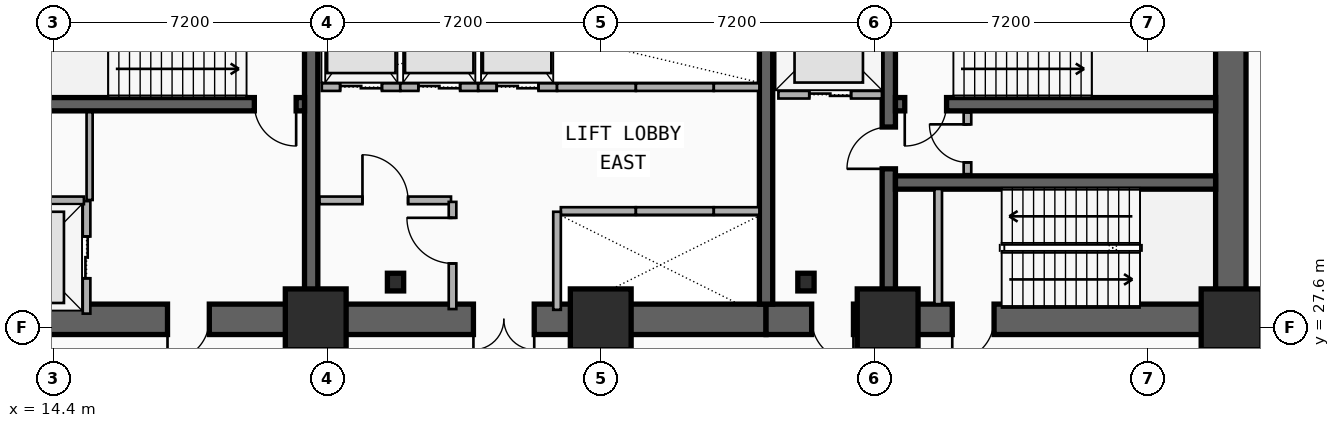
"""IFC4 building model, lengths in metres.
Left out: names, types, materials, properties, quantities, classifications, styles, units other than length and angle.
Written with IfcOpenShell. Run it as: python <this file> out.ifc"""

import sys

from ifc_helpers import new_model, si_unit, direction, frame, frame_2d, origin, origin_2d, place, context, subcontext, project, spatial, rectangle, i_section, extrude, element, fill, save


model = new_model("IFC4")
c1 = context("Model", 3, precision=1e-05, world=origin(), true_north=direction((0.0, 1.0)))
c2 = subcontext(c1, "Body", "Model", "MODEL_VIEW")
j1 = project(units=[si_unit("LENGTHUNIT", "METRE"), si_unit("PLANEANGLEUNIT", "RADIAN")], contexts=[c1])
p1 = place(None, origin())
s1 = spatial("IfcSite", under=j1, at=p1, CompositionType="ELEMENT")
p2 = place(p1, origin())
s2 = spatial("IfcBuilding", under=s1, at=p2, CompositionType="ELEMENT")
p3 = place(p2, frame((0.0, 0.0, 5.4)))
s3 = spatial("IfcBuildingStorey", under=s2, at=p3, CompositionType="ELEMENT", Elevation=5.4)
p4 = place(p3, frame((21.18, 27.82, 0.0), z_axis=(0.0, 0.0, 1.0), x_axis=(-1.0, 0.0, 0.0)))
e1 = element("IfcWall", 1, at=p4, inside=s3, PredefinedType="SHEAR", context=c2, shape_type="SweptSolid", body=[
    extrude(rectangle(XDim=9.03, YDim=0.8, at=frame_2d((4.515, 0.0))), origin(), (0.0, 0.0, 1.0), 5.0),
])
p5 = place(p4, frame((2.68, 0.0, 0.0)))
e2 = element("IfcOpeningElement", 2, at=p5, cuts=e1, PredefinedType="OPENING", context=c2, shape_type="SweptSolid", body=[
    extrude(rectangle(XDim=1.1, YDim=2.15, at=frame_2d((0.55, 1.075))), frame((0.0, 0.41, 0.0), z_axis=(0.0, -1.0, 0.0), x_axis=(1.0, 0.0, 0.0)), (0.0, 0.0, 1.0), 0.82),
])
p6 = place(p3, frame((33.15, 27.82, 0.0), z_axis=(0.0, 0.0, 1.0), x_axis=(-1.0, 0.0, 0.0)))
e3 = element("IfcWall", 3, at=p6, inside=s3, PredefinedType="SHEAR", context=c2, shape_type="SweptSolid", body=[
    extrude(rectangle(XDim=11.97, YDim=0.8, at=frame_2d((5.985, 0.0))), origin(), (0.0, 0.0, 1.0), 5.0),
])
p7 = place(p6, frame((6.1, 0.0, 0.0)))
e4 = element("IfcOpeningElement", 4, at=p7, cuts=e3, PredefinedType="OPENING", context=c2, shape_type="SweptSolid", body=[
    extrude(rectangle(XDim=1.6, YDim=2.2, at=frame_2d((0.8, 1.1))), frame((0.0, 0.41, 0.0), z_axis=(0.0, -1.0, 0.0), x_axis=(1.0, 0.0, 0.0)), (0.0, 0.0, 1.0), 0.82),
])
p8 = place(p3, frame((45.38, 27.82, 0.0), z_axis=(0.0, 0.0, 1.0), x_axis=(-1.0, 0.0, 0.0)))
e5 = element("IfcWall", 5, at=p8, inside=s3, PredefinedType="SHEAR", context=c2, shape_type="SweptSolid", body=[
    extrude(rectangle(XDim=12.23, YDim=0.8, at=frame_2d((6.115, 0.0))), origin(), (0.0, 0.0, 1.0), 5.0),
])
p9 = place(p8, frame((9.93, 0.0, 0.0)))
e6 = element("IfcOpeningElement", 6, at=p9, cuts=e5, PredefinedType="OPENING", context=c2, shape_type="SweptSolid", body=[
    extrude(rectangle(XDim=1.1, YDim=2.15, at=frame_2d((0.55, 1.075))), frame((0.0, 0.41, 0.0), z_axis=(0.0, -1.0, 0.0), x_axis=(1.0, 0.0, 0.0)), (0.0, 0.0, 1.0), 0.82),
])
p10 = place(p8, frame((6.23, 0.0, 0.0)))
e7 = element("IfcOpeningElement", 7, at=p10, cuts=e5, PredefinedType="OPENING", context=c2, shape_type="SweptSolid", body=[
    extrude(rectangle(XDim=1.1, YDim=2.15, at=frame_2d((0.55, 1.075))), frame((0.0, 0.41, 0.0), z_axis=(0.0, -1.0, 0.0), x_axis=(1.0, 0.0, 0.0)), (0.0, 0.0, 1.0), 0.82),
])
p11 = place(p3, frame((45.38, 28.22, 0.0), z_axis=(0.0, 0.0, 1.0), x_axis=(0.0, 1.0, 0.0)))
e8 = element("IfcWall", 8, at=p11, inside=s3, PredefinedType="SHEAR", context=c2, shape_type="SweptSolid", body=[
    extrude(rectangle(XDim=8.43, YDim=0.8, at=frame_2d((4.215, 0.0))), origin(), (0.0, 0.0, 1.0), 5.0),
])
for number, where, z_axis, x_axis in (
    (9, (21.18, 28.22, 0.0), (0.0, 0.0, 1.0), (0.0, 1.0, 0.0)),
    (10, (33.15, 28.22, 0.0), (0.0, 0.0, 1.0), (0.0, 1.0, 0.0)),
):
    element("IfcWall", number, at=place(p3, frame(where, z_axis=z_axis, x_axis=x_axis)), inside=s3, PredefinedType="SHEAR", context=c2, shape_type="SweptSolid", body=[
        extrude(rectangle(XDim=8.43, YDim=0.35, at=frame_2d((4.215, 0.0))), origin(), (0.0, 0.0, 1.0), 5.0),
    ])
p12 = place(p3, frame((36.38, 28.22, 0.0), z_axis=(0.0, 0.0, 1.0), x_axis=(0.0, 1.0, 0.0)))
e11 = element("IfcWall", 11, at=p12, inside=s3, PredefinedType="SHEAR", context=c2, shape_type="SweptSolid", body=[
    extrude(rectangle(XDim=8.43, YDim=0.35, at=frame_2d((4.215, 0.0))), origin(), (0.0, 0.0, 1.0), 5.0),
])
p13 = place(p12, frame((3.56, 0.0, 0.0)))
e12 = element("IfcOpeningElement", 12, at=p13, cuts=e11, PredefinedType="OPENING", context=c2, shape_type="SweptSolid", body=[
    extrude(rectangle(XDim=1.1, YDim=2.15, at=frame_2d((0.55, 1.075))), frame((0.0, 0.185, 0.0), z_axis=(0.0, -1.0, 0.0), x_axis=(1.0, 0.0, 0.0)), (0.0, 0.0, 1.0), 0.37),
])
p14 = place(p3, frame((21.005, 33.48, 0.0), z_axis=(0.0, 0.0, 1.0), x_axis=(-1.0, 0.0, 0.0)))
e13 = element("IfcWall", 13, at=p14, inside=s3, PredefinedType="SHEAR", context=c2, shape_type="SweptSolid", body=[
    extrude(rectangle(XDim=8.455, YDim=0.35, at=frame_2d((4.228, 0.0))), origin(), (0.0, 0.0, 1.0), 5.0),
])
p15 = place(p14, frame((0.22, 0.0, 0.0)))
e14 = element("IfcOpeningElement", 14, at=p15, cuts=e13, PredefinedType="OPENING", context=c2, shape_type="SweptSolid", body=[
    extrude(rectangle(XDim=1.1, YDim=2.15, at=frame_2d((0.55, 1.075))), frame((0.0, 0.185, 0.0), z_axis=(0.0, -1.0, 0.0), x_axis=(1.0, 0.0, 0.0)), (0.0, 0.0, 1.0), 0.37),
])
p16 = place(p3, frame((44.98, 33.48, 0.0), z_axis=(0.0, 0.0, 1.0), x_axis=(-1.0, 0.0, 0.0)))
e15 = element("IfcWall", 15, at=p16, inside=s3, PredefinedType="SHEAR", context=c2, shape_type="SweptSolid", body=[
    extrude(rectangle(XDim=8.425, YDim=0.35, at=frame_2d((4.212, 0.0))), origin(), (0.0, 0.0, 1.0), 5.0),
])
p17 = place(p16, frame((7.08, 0.0, 0.0)))
e16 = element("IfcOpeningElement", 16, at=p17, cuts=e15, PredefinedType="OPENING", context=c2, shape_type="SweptSolid", body=[
    extrude(rectangle(XDim=1.1, YDim=2.15, at=frame_2d((0.55, 1.075))), frame((0.0, 0.185, 0.0), z_axis=(0.0, -1.0, 0.0), x_axis=(1.0, 0.0, 0.0)), (0.0, 0.0, 1.0), 0.37),
])
p18 = place(p3, frame((36.555, 31.42, 0.0), z_axis=(0.0, 0.0, 1.0), x_axis=(1.0, 0.0, 0.0)))
e17 = element("IfcWall", 17, at=p18, inside=s3, PredefinedType="SHEAR", context=c2, shape_type="SweptSolid", body=[
    extrude(rectangle(XDim=8.425, YDim=0.35, at=frame_2d((4.212, 0.0))), origin(), (0.0, 0.0, 1.0), 5.0),
])
for number, where, z_axis, x_axis in (
    (18, (23.4, 28.8, 0.0), (0.0, 0.0, 1.0), (1.0, 0.0, 0.0)),
    (19, (34.2, 28.8, 0.0), (0.0, 0.0, 1.0), (1.0, 0.0, 0.0)),
):
    element("IfcColumn", number, at=place(p3, frame(where, z_axis=z_axis, x_axis=x_axis)), inside=s3, PredefinedType="COLUMN", context=c2, shape_type="SweptSolid", body=[
        extrude(i_section(OverallWidth=0.428, OverallDepth=0.465, WebThickness=0.045, FlangeThickness=0.073, FilletRadius=0.015, at=origin_2d()), origin(), (0.0, 0.0, 1.0), 5.0),
    ])
for number, where, z_axis, x_axis in (
    (20, (21.3, 27.82, 0.0), (0.0, 0.0, 1.0), (1.0, 0.0, 0.0)),
    (21, (28.8, 27.82, 0.0), (0.0, 0.0, 1.0), (1.0, 0.0, 0.0)),
    (22, (36.35, 27.82, 0.0), (0.0, 0.0, 1.0), (1.0, 0.0, 0.0)),
    (23, (45.4, 27.82, 0.0), (0.0, 0.0, 1.0), (1.0, 0.0, 0.0)),
):
    element("IfcColumn", number, at=place(p3, frame(where, z_axis=z_axis, x_axis=x_axis)), inside=s3, PredefinedType="COLUMN", context=c2, shape_type="SweptSolid", body=[
        extrude(rectangle(XDim=1.6, YDim=1.6, at=origin_2d()), origin(), (0.0, 0.0, 1.0), 5.0),
    ])
p19 = place(p3, frame((15.27, 27.97, 0.0), z_axis=(0.0, 0.0, 1.0), x_axis=(0.0, 1.0, 0.0)))
e24 = element("IfcWall", 24, at=p19, inside=s3, PredefinedType="PARTITIONING", context=c2, shape_type="SweptSolid", body=[
    extrude(rectangle(XDim=2.96, YDim=0.2, at=frame_2d((1.48, 0.0))), origin(), (0.0, 0.0, 1.0), 3.672),
])
p20 = place(p19, frame((0.93, 0.0, 0.0)))
e25 = element("IfcOpeningElement", 25, at=p20, cuts=e24, PredefinedType="OPENING", context=c2, shape_type="SweptSolid", body=[
    extrude(rectangle(XDim=1.1, YDim=2.15, at=frame_2d((0.55, 1.075))), frame((0.0, 0.11, 0.0), z_axis=(0.0, -1.0, 0.0), x_axis=(1.0, 0.0, 0.0)), (0.0, 0.0, 1.0), 0.22),
])
p21 = place(p3, frame((12.45, 30.95, 0.0), z_axis=(0.0, 0.0, 1.0), x_axis=(1.0, 0.0, 0.0)))
e26 = element("IfcWall", 26, at=p21, inside=s3, PredefinedType="PARTITIONING", context=c2, shape_type="SweptSolid", body=[
    extrude(rectangle(XDim=2.75, YDim=0.2, at=frame_2d((1.375, 0.0))), origin(), (0.0, 0.0, 1.0), 3.672),
])
p22 = place(p3, frame((33.475, 33.73, 0.0), z_axis=(0.0, 0.0, 1.0), x_axis=(1.0, 0.0, 0.0)))
e27 = element("IfcWall", 27, at=p22, inside=s3, PredefinedType="PARTITIONING", context=c2, shape_type="SweptSolid", body=[
    extrude(rectangle(XDim=2.725, YDim=0.2, at=frame_2d((1.362, 0.0))), origin(), (0.0, 0.0, 1.0), 3.672),
])
p23 = place(p22, frame((0.812, 0.0, 0.0)))
e28 = element("IfcOpeningElement", 28, at=p23, cuts=e27, PredefinedType="OPENING", context=c2, shape_type="SweptSolid", body=[
    extrude(rectangle(XDim=1.1, YDim=2.15, at=frame_2d((0.55, 1.075))), frame((0.0, 0.11, 0.0), z_axis=(0.0, -1.0, 0.0), x_axis=(1.0, 0.0, 0.0)), (0.0, 0.0, 1.0), 0.22),
])
p24 = place(p3, frame((27.75, 30.67, 0.0), z_axis=(0.0, 0.0, 1.0), x_axis=(1.0, 0.0, 0.0)))
e29 = element("IfcWall", 29, at=p24, inside=s3, PredefinedType="PARTITIONING", context=c2, shape_type="SweptSolid", body=[
    extrude(rectangle(XDim=1.975, YDim=0.2, at=frame_2d((0.988, 0.0))), origin(), (0.0, 0.0, 1.0), 3.672),
])
p25 = place(p3, frame((27.65, 28.07, 0.0), z_axis=(0.0, 0.0, 1.0), x_axis=(0.0, 1.0, 0.0)))
e30 = element("IfcWall", 30, at=p25, inside=s3, PredefinedType="PARTITIONING", context=c2, shape_type="SweptSolid", body=[
    extrude(rectangle(XDim=2.58, YDim=0.2, at=frame_2d((1.29, 0.0))), origin(), (0.0, 0.0, 1.0), 3.672),
])
p26 = place(p3, frame((29.725, 30.67, 0.0), z_axis=(0.0, 0.0, 1.0), x_axis=(1.0, 0.0, 0.0)))
e31 = element("IfcWall", 31, at=p26, inside=s3, PredefinedType="PARTITIONING", context=c2, shape_type="SweptSolid", body=[
    extrude(rectangle(XDim=2.05, YDim=0.2, at=frame_2d((1.025, 0.0))), origin(), (0.0, 0.0, 1.0), 4.7),
])
p27 = place(p3, frame((31.775, 30.67, 0.0), z_axis=(0.0, 0.0, 1.0), x_axis=(1.0, 0.0, 0.0)))
e32 = element("IfcWall", 32, at=p27, inside=s3, PredefinedType="PARTITIONING", context=c2, shape_type="SweptSolid", body=[
    extrude(rectangle(XDim=1.2, YDim=0.2, at=frame_2d((0.6, 0.0))), origin(), (0.0, 0.0, 1.0), 4.7),
])
p28 = place(p3, frame((21.46, 33.93, 0.0), z_axis=(0.0, 0.0, 1.0), x_axis=(1.0, 0.0, 0.0)))
e33 = element("IfcWall", 33, at=p28, inside=s3, PredefinedType="PARTITIONING", context=c2, shape_type="SweptSolid", body=[
    extrude(rectangle(XDim=2.065, YDim=0.2, at=frame_2d((1.032, 0.0))), origin(), (0.0, 0.0, 1.0), 3.672),
])
p29 = place(p28, frame((0.482, 0.0, 0.0)))
e34 = element("IfcOpeningElement", 34, at=p29, cuts=e33, PredefinedType="OPENING", context=c2, shape_type="SweptSolid", body=[
    extrude(rectangle(XDim=1.1, YDim=2.15, at=frame_2d((0.55, 1.075))), frame((0.0, 0.11, 0.0), z_axis=(0.0, -1.0, 0.0), x_axis=(1.0, 0.0, 0.0)), (0.0, 0.0, 1.0), 0.22),
])
p30 = place(p3, frame((23.525, 33.93, 0.0), z_axis=(0.0, 0.0, 1.0), x_axis=(1.0, 0.0, 0.0)))
e35 = element("IfcWall", 35, at=p30, inside=s3, PredefinedType="PARTITIONING", context=c2, shape_type="SweptSolid", body=[
    extrude(rectangle(XDim=2.05, YDim=0.2, at=frame_2d((1.025, 0.0))), origin(), (0.0, 0.0, 1.0), 4.7),
])
p31 = place(p30, frame((0.475, 0.0, 0.0)))
e36 = element("IfcOpeningElement", 36, at=p31, cuts=e35, PredefinedType="OPENING", context=c2, shape_type="SweptSolid", body=[
    extrude(rectangle(XDim=1.1, YDim=2.15, at=frame_2d((0.55, 1.075))), frame((0.0, 0.11, 0.0), z_axis=(0.0, -1.0, 0.0), x_axis=(1.0, 0.0, 0.0)), (0.0, 0.0, 1.0), 0.22),
])
p32 = place(p3, frame((25.575, 33.93, 0.0), z_axis=(0.0, 0.0, 1.0), x_axis=(1.0, 0.0, 0.0)))
e37 = element("IfcWall", 37, at=p32, inside=s3, PredefinedType="PARTITIONING", context=c2, shape_type="SweptSolid", body=[
    extrude(rectangle(XDim=2.075, YDim=0.2, at=frame_2d((1.038, 0.0))), origin(), (0.0, 0.0, 1.0), 4.7),
])
p33 = place(p32, frame((0.488, 0.0, 0.0)))
e38 = element("IfcOpeningElement", 38, at=p33, cuts=e37, PredefinedType="OPENING", context=c2, shape_type="SweptSolid", body=[
    extrude(rectangle(XDim=1.1, YDim=2.15, at=frame_2d((0.55, 1.075))), frame((0.0, 0.11, 0.0), z_axis=(0.0, -1.0, 0.0), x_axis=(1.0, 0.0, 0.0)), (0.0, 0.0, 1.0), 0.22),
])
p34 = place(p3, frame((27.65, 33.93, 0.0), z_axis=(0.0, 0.0, 1.0), x_axis=(1.0, 0.0, 0.0)))
e39 = element("IfcWall", 39, at=p34, inside=s3, PredefinedType="PARTITIONING", context=c2, shape_type="SweptSolid", body=[
    extrude(rectangle(XDim=2.075, YDim=0.2, at=frame_2d((1.038, 0.0))), origin(), (0.0, 0.0, 1.0), 3.672),
])
p35 = place(p3, frame((29.725, 33.93, 0.0), z_axis=(0.0, 0.0, 1.0), x_axis=(1.0, 0.0, 0.0)))
e40 = element("IfcWall", 40, at=p35, inside=s3, PredefinedType="PARTITIONING", context=c2, shape_type="SweptSolid", body=[
    extrude(rectangle(XDim=2.05, YDim=0.2, at=frame_2d((1.025, 0.0))), origin(), (0.0, 0.0, 1.0), 4.7),
])
p36 = place(p3, frame((31.775, 33.93, 0.0), z_axis=(0.0, 0.0, 1.0), x_axis=(1.0, 0.0, 0.0)))
e41 = element("IfcWall", 41, at=p36, inside=s3, PredefinedType="PARTITIONING", context=c2, shape_type="SweptSolid", body=[
    extrude(rectangle(XDim=1.2, YDim=0.2, at=frame_2d((0.6, 0.0))), origin(), (0.0, 0.0, 1.0), 4.7),
])
p37 = place(p3, frame((37.68, 28.22, 0.0), z_axis=(0.0, 0.0, 1.0), x_axis=(0.0, 1.0, 0.0)))
e42 = element("IfcWall", 42, at=p37, inside=s3, PredefinedType="PARTITIONING", context=c2, shape_type="SweptSolid", body=[
    extrude(rectangle(XDim=3.03, YDim=0.2, at=frame_2d((1.515, 0.0))), origin(), (0.0, 0.0, 1.0), 4.7),
])
p38 = place(p3, frame((38.45, 31.64, 0.0), z_axis=(0.0, 0.0, 1.0), x_axis=(0.0, 1.0, 0.0)))
e43 = element("IfcWall", 43, at=p38, inside=s3, PredefinedType="PARTITIONING", context=c2, shape_type="SweptSolid", body=[
    extrude(rectangle(XDim=1.62, YDim=0.2, at=frame_2d((0.81, 0.0))), origin(), (0.0, 0.0, 1.0), 4.7),
])
p39 = place(p38, frame((0.31, 0.0, 0.0)))
e44 = element("IfcOpeningElement", 44, at=p39, cuts=e43, PredefinedType="OPENING", context=c2, shape_type="SweptSolid", body=[
    extrude(rectangle(XDim=1.0, YDim=2.15, at=frame_2d((0.5, 1.075))), frame((0.0, 0.11, 0.0), z_axis=(0.0, -1.0, 0.0), x_axis=(1.0, 0.0, 0.0)), (0.0, 0.0, 1.0), 0.22),
])
p40 = place(p3, frame((21.4, 30.95, 0.0), z_axis=(0.0, 0.0, 1.0), x_axis=(1.0, 0.0, 0.0)))
e45 = element("IfcWall", 45, at=p40, inside=s3, PredefinedType="PARTITIONING", context=c2, shape_type="SweptSolid", body=[
    extrude(rectangle(XDim=3.46, YDim=0.2, at=frame_2d((1.73, 0.0))), origin(), (0.0, 0.0, 1.0), 3.672),
])
p41 = place(p40, frame((1.13, 0.0, 0.0)))
e46 = element("IfcOpeningElement", 46, at=p41, cuts=e45, PredefinedType="OPENING", context=c2, shape_type="SweptSolid", body=[
    extrude(rectangle(XDim=1.2, YDim=2.15, at=frame_2d((0.6, 1.075))), frame((0.0, 0.11, 0.0), z_axis=(0.0, -1.0, 0.0), x_axis=(1.0, 0.0, 0.0)), (0.0, 0.0, 1.0), 0.22),
])
p42 = place(p3, frame((24.9, 28.09, 0.0), z_axis=(0.0, 0.0, 1.0), x_axis=(0.0, 1.0, 0.0)))
e47 = element("IfcWall", 47, at=p42, inside=s3, PredefinedType="PARTITIONING", context=c2, shape_type="SweptSolid", body=[
    extrude(rectangle(XDim=2.82, YDim=0.2, at=frame_2d((1.41, 0.0))), origin(), (0.0, 0.0, 1.0), 4.7),
])
p43 = place(p42, frame((1.201, 0.0, 0.0)))
e48 = element("IfcOpeningElement", 48, at=p43, cuts=e47, PredefinedType="OPENING", context=c2, shape_type="SweptSolid", body=[
    extrude(rectangle(XDim=1.2, YDim=2.15, at=frame_2d((0.6, 1.075))), frame((0.0, 0.11, 0.0), z_axis=(0.0, -1.0, 0.0), x_axis=(1.0, 0.0, 0.0)), (0.0, 0.0, 1.0), 0.22),
])
p44 = place(p3, frame((15.35, 30.96, 0.0), z_axis=(0.0, 0.0, 1.0), x_axis=(0.0, 1.0, 0.0)))
e49 = element("IfcWall", 49, at=p44, inside=s3, PredefinedType="PARTITIONING", context=c2, shape_type="SweptSolid", body=[
    extrude(rectangle(XDim=2.31, YDim=0.16, at=frame_2d((1.155, 0.0))), origin(), (0.0, 0.0, 1.0), 4.7),
])
p45 = place(p3, frame((45.41, 27.6, 0.0), z_axis=(0.0, 0.0, 1.0), x_axis=(1.0, 0.0, 0.0)))
e50 = element("IfcWall", 50, at=p45, inside=s3, PredefinedType="PARTITIONING", context=c2, shape_type="SweptSolid", body=[
    extrude(rectangle(XDim=0.91, YDim=0.16, at=frame_2d((0.455, 0.0))), origin(), (0.0, 0.0, 1.0), 3.672),
])
p46 = place(p20, origin())
e51 = element("IfcDoor", 51, at=p46, inside=s3, OperationType="DOUBLE_DOOR_SLIDING", PredefinedType="DOOR", context=c2, shape_type="SweptSolid", body=[
    extrude(rectangle(XDim=1.1, YDim=2.15, at=frame_2d((0.55, 1.075))), frame((0.0, 0.025, 0.0), z_axis=(0.0, -1.0, 0.0), x_axis=(1.0, 0.0, 0.0)), (0.0, 0.0, 1.0), 0.05),
])
fill(e25, e51)
p47 = place(p23, origin())
e52 = element("IfcDoor", 52, at=p47, inside=s3, OperationType="DOUBLE_DOOR_SLIDING", PredefinedType="DOOR", context=c2, shape_type="SweptSolid", body=[
    extrude(rectangle(XDim=1.1, YDim=2.15, at=frame_2d((0.55, 1.075))), frame((0.0, 0.025, 0.0), z_axis=(0.0, -1.0, 0.0), x_axis=(1.0, 0.0, 0.0)), (0.0, 0.0, 1.0), 0.05),
])
fill(e28, e52)
p48 = place(p29, origin())
e53 = element("IfcDoor", 53, at=p48, inside=s3, OperationType="DOUBLE_DOOR_SLIDING", PredefinedType="DOOR", context=c2, shape_type="SweptSolid", body=[
    extrude(rectangle(XDim=1.1, YDim=2.15, at=frame_2d((0.55, 1.075))), frame((0.0, 0.025, 0.0), z_axis=(0.0, -1.0, 0.0), x_axis=(1.0, 0.0, 0.0)), (0.0, 0.0, 1.0), 0.05),
])
fill(e34, e53)
p49 = place(p31, origin())
e54 = element("IfcDoor", 54, at=p49, inside=s3, OperationType="DOUBLE_DOOR_SLIDING", PredefinedType="DOOR", context=c2, shape_type="SweptSolid", body=[
    extrude(rectangle(XDim=1.1, YDim=2.15, at=frame_2d((0.55, 1.075))), frame((0.0, 0.025, 0.0), z_axis=(0.0, -1.0, 0.0), x_axis=(1.0, 0.0, 0.0)), (0.0, 0.0, 1.0), 0.05),
])
fill(e36, e54)
p50 = place(p33, origin())
e55 = element("IfcDoor", 55, at=p50, inside=s3, OperationType="DOUBLE_DOOR_SLIDING", PredefinedType="DOOR", context=c2, shape_type="SweptSolid", body=[
    extrude(rectangle(XDim=1.1, YDim=2.15, at=frame_2d((0.55, 1.075))), frame((0.0, 0.025, 0.0), z_axis=(0.0, -1.0, 0.0), x_axis=(1.0, 0.0, 0.0)), (0.0, 0.0, 1.0), 0.05),
])
fill(e38, e55)
p51 = place(p15, origin())
e56 = element("IfcDoor", 56, at=p51, inside=s3, OperationType="SINGLE_SWING_LEFT", PredefinedType="DOOR", context=c2, shape_type="SweptSolid", body=[
    extrude(rectangle(XDim=1.1, YDim=2.15, at=frame_2d((0.55, 1.075))), frame((0.0, 0.025, 0.0), z_axis=(0.0, -1.0, 0.0), x_axis=(1.0, 0.0, 0.0)), (0.0, 0.0, 1.0), 0.05),
])
fill(e14, e56)
p52 = place(p5, origin())
e57 = element("IfcDoor", 57, at=p52, inside=s3, OperationType="SINGLE_SWING_RIGHT", PredefinedType="DOOR", context=c2, shape_type="SweptSolid", body=[
    extrude(rectangle(XDim=1.1, YDim=2.15, at=frame_2d((0.55, 1.075))), frame((0.0, 0.025, 0.0), z_axis=(0.0, -1.0, 0.0), x_axis=(1.0, 0.0, 0.0)), (0.0, 0.0, 1.0), 0.05),
])
fill(e2, e57)
p53 = place(p17, origin())
e58 = element("IfcDoor", 58, at=p53, inside=s3, OperationType="SINGLE_SWING_RIGHT", PredefinedType="DOOR", context=c2, shape_type="SweptSolid", body=[
    extrude(rectangle(XDim=1.1, YDim=2.15, at=frame_2d((0.55, 1.075))), frame((0.0, 0.025, 0.0), z_axis=(0.0, -1.0, 0.0), x_axis=(1.0, 0.0, 0.0)), (0.0, 0.0, 1.0), 0.05),
])
fill(e16, e58)
p54 = place(p13, origin())
e59 = element("IfcDoor", 59, at=p54, inside=s3, OperationType="SINGLE_SWING_LEFT", PredefinedType="DOOR", context=c2, shape_type="SweptSolid", body=[
    extrude(rectangle(XDim=1.1, YDim=2.15, at=frame_2d((0.55, 1.075))), frame((0.0, 0.025, 0.0), z_axis=(0.0, -1.0, 0.0), x_axis=(1.0, 0.0, 0.0)), (0.0, 0.0, 1.0), 0.05),
])
fill(e12, e59)
p55 = place(p9, origin())
e60 = element("IfcDoor", 60, at=p55, inside=s3, OperationType="SINGLE_SWING_LEFT", PredefinedType="DOOR", context=c2, shape_type="SweptSolid", body=[
    extrude(rectangle(XDim=1.1, YDim=2.15, at=frame_2d((0.55, 1.075))), frame((0.0, 0.025, 0.0), z_axis=(0.0, -1.0, 0.0), x_axis=(1.0, 0.0, 0.0)), (0.0, 0.0, 1.0), 0.05),
])
fill(e6, e60)
p56 = place(p10, origin())
e61 = element("IfcDoor", 61, at=p56, inside=s3, OperationType="SINGLE_SWING_RIGHT", PredefinedType="DOOR", context=c2, shape_type="SweptSolid", body=[
    extrude(rectangle(XDim=1.1, YDim=2.15, at=frame_2d((0.55, 1.075))), frame((0.0, 0.025, 0.0), z_axis=(0.0, -1.0, 0.0), x_axis=(1.0, 0.0, 0.0)), (0.0, 0.0, 1.0), 0.05),
])
fill(e7, e61)
p57 = place(p7, origin())
e62 = element("IfcDoor", 62, at=p57, inside=s3, OperationType="SINGLE_SWING_LEFT", PredefinedType="DOOR", context=c2, shape_type="SweptSolid", body=[
    extrude(rectangle(XDim=1.6, YDim=2.2, at=frame_2d((0.8, 1.1))), frame((0.0, 0.025, 0.0), z_axis=(0.0, -1.0, 0.0), x_axis=(1.0, 0.0, 0.0)), (0.0, 0.0, 1.0), 0.05),
])
fill(e4, e62)
p58 = place(p39, origin())
e63 = element("IfcDoor", 63, at=p58, inside=s3, OperationType="SINGLE_SWING_RIGHT", PredefinedType="DOOR", context=c2, shape_type="SweptSolid", body=[
    extrude(rectangle(XDim=1.0, YDim=2.15, at=frame_2d((0.5, 1.075))), frame((0.0, 0.025, 0.0), z_axis=(0.0, -1.0, 0.0), x_axis=(1.0, 0.0, 0.0)), (0.0, 0.0, 1.0), 0.05),
])
fill(e44, e63)
p59 = place(p41, origin())
e64 = element("IfcDoor", 64, at=p59, inside=s3, OperationType="SINGLE_SWING_LEFT", PredefinedType="DOOR", context=c2, shape_type="SweptSolid", body=[
    extrude(rectangle(XDim=1.2, YDim=2.15, at=frame_2d((0.6, 1.075))), frame((0.0, 0.025, 0.0), z_axis=(0.0, -1.0, 0.0), x_axis=(1.0, 0.0, 0.0)), (0.0, 0.0, 1.0), 0.05),
])
fill(e46, e64)
p60 = place(p43, origin())
e65 = element("IfcDoor", 65, at=p60, inside=s3, OperationType="SINGLE_SWING_RIGHT", PredefinedType="DOOR", context=c2, shape_type="SweptSolid", body=[
    extrude(rectangle(XDim=1.2, YDim=2.15, at=frame_2d((0.6, 1.075))), frame((0.0, 0.025, 0.0), z_axis=(0.0, -1.0, 0.0), x_axis=(1.0, 0.0, 0.0)), (0.0, 0.0, 1.0), 0.05),
])
fill(e48, e65)
save(model, sys.argv[1])
